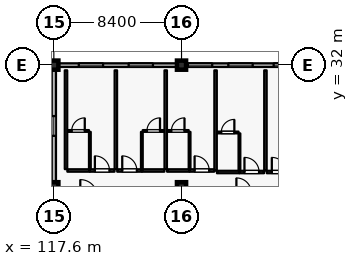
"""IFC4 building model, lengths in metres.
Left out: names, types, materials, properties, quantities, classifications, styles, units other than length and angle.
Written with IfcOpenShell. Run it as: python <this file> out.ifc"""

import sys

from ifc_helpers import new_model, si_unit, direction, frame, frame_2d, origin, origin_2d, place, context, subcontext, project, spatial, rectangle, extrude, element, fill, save


model = new_model("IFC4")
c1 = context("Model", 3, precision=1e-05, world=origin(), true_north=direction((0.0, 1.0)))
c2 = subcontext(c1, "Body", "Model", "MODEL_VIEW")
j1 = project(units=[si_unit("LENGTHUNIT", "METRE"), si_unit("PLANEANGLEUNIT", "RADIAN")], contexts=[c1])
p1 = place(None, origin())
s1 = spatial("IfcSite", under=j1, at=p1, CompositionType="ELEMENT")
p2 = place(p1, origin())
s2 = spatial("IfcBuilding", under=s1, at=p2, CompositionType="ELEMENT")
p3 = place(p2, frame((0.0, 0.0, 39.6)))
s3 = spatial("IfcBuildingStorey", under=s2, at=p3, CompositionType="ELEMENT", Elevation=39.6)
for number, where, z_axis, x_axis in (
    (1, (117.6, 32.0, 0.0), (0.0, 0.0, 1.0), (1.0, 0.0, 0.0)),
    (2, (126.0, 32.0, 0.0), (0.0, 0.0, 1.0), (1.0, 0.0, 0.0)),
    (3, (117.6, 24.0, 0.0), (0.0, 0.0, 1.0), (1.0, 0.0, 0.0)),
    (4, (126.0, 24.0, 0.0), (0.0, 0.0, 1.0), (1.0, 0.0, 0.0)),
):
    element("IfcColumn", number, at=place(p3, frame(where, z_axis=z_axis, x_axis=x_axis)), inside=s3, PredefinedType="COLUMN", context=c2, shape_type="SweptSolid", body=[
        extrude(rectangle(XDim=0.6, YDim=0.6, at=origin_2d()), origin(), (0.0, 0.0, 1.0), 3.6),
    ])
p4 = place(p3, frame((117.9, 32.0, 0.0), z_axis=(0.0, 0.0, 1.0), x_axis=(1.0, 0.0, 0.0)))
e5 = element("IfcWall", 5, at=p4, inside=s3, PredefinedType="SOLIDWALL", context=c2, shape_type="SweptSolid", body=[
    extrude(rectangle(XDim=7.8, YDim=0.24, at=frame_2d((3.9, 0.0))), origin(), (0.0, 0.0, 1.0), 2.89),
])
p5 = place(p4, frame((1.34, 0.0, 0.8)))
e6 = element("IfcOpeningElement", 6, at=p5, cuts=e5, PredefinedType="OPENING", context=c2, shape_type="SweptSolid", body=[
    extrude(rectangle(XDim=1.6, YDim=1.6, at=frame_2d((0.8, 0.8))), frame((0.0, 0.13, 0.0), z_axis=(0.0, -1.0, 0.0), x_axis=(1.0, 0.0, 0.0)), (0.0, 0.0, 1.0), 0.26),
])
p6 = place(p4, frame((4.62, 0.0, 0.8)))
e7 = element("IfcOpeningElement", 7, at=p6, cuts=e5, PredefinedType="OPENING", context=c2, shape_type="SweptSolid", body=[
    extrude(rectangle(XDim=1.6, YDim=1.6, at=frame_2d((0.8, 0.8))), frame((0.0, 0.13, 0.0), z_axis=(0.0, -1.0, 0.0), x_axis=(1.0, 0.0, 0.0)), (0.0, 0.0, 1.0), 0.26),
])
p7 = place(p3, frame((126.3, 32.0, 0.0), z_axis=(0.0, 0.0, 1.0), x_axis=(1.0, 0.0, 0.0)))
e8 = element("IfcWall", 8, at=p7, inside=s3, PredefinedType="SOLIDWALL", context=c2, shape_type="SweptSolid", body=[
    extrude(rectangle(XDim=7.8, YDim=0.24, at=frame_2d((3.9, 0.0))), origin(), (0.0, 0.0, 1.0), 2.89),
])
p8 = place(p7, frame((0.12, 0.0, 0.8)))
e9 = element("IfcOpeningElement", 9, at=p8, cuts=e8, PredefinedType="OPENING", context=c2, shape_type="SweptSolid", body=[
    extrude(rectangle(XDim=1.6, YDim=1.6, at=frame_2d((0.8, 0.8))), frame((0.0, 0.13, 0.0), z_axis=(0.0, -1.0, 0.0), x_axis=(1.0, 0.0, 0.0)), (0.0, 0.0, 1.0), 0.26),
])
p9 = place(p7, frame((2.78, 0.0, 0.8)))
e10 = element("IfcOpeningElement", 10, at=p9, cuts=e8, PredefinedType="OPENING", context=c2, shape_type="SweptSolid", body=[
    extrude(rectangle(XDim=1.6, YDim=1.6, at=frame_2d((0.8, 0.8))), frame((0.0, 0.13, 0.0), z_axis=(0.0, -1.0, 0.0), x_axis=(1.0, 0.0, 0.0)), (0.0, 0.0, 1.0), 0.26),
])
p10 = place(p7, frame((5.76, 0.0, 0.8)))
e11 = element("IfcOpeningElement", 11, at=p10, cuts=e8, PredefinedType="OPENING", context=c2, shape_type="SweptSolid", body=[
    extrude(rectangle(XDim=1.6, YDim=1.6, at=frame_2d((0.8, 0.8))), frame((0.0, 0.13, 0.0), z_axis=(0.0, -1.0, 0.0), x_axis=(1.0, 0.0, 0.0)), (0.0, 0.0, 1.0), 0.26),
])
p11 = place(p3, frame((117.6, 24.3, 0.0), z_axis=(0.0, 0.0, 1.0), x_axis=(0.0, 1.0, 0.0)))
e12 = element("IfcWall", 12, at=p11, inside=s3, PredefinedType="SOLIDWALL", context=c2, shape_type="SweptSolid", body=[
    extrude(rectangle(XDim=7.4, YDim=0.28, at=frame_2d((3.7, 0.0))), origin(), (0.0, 0.0, 1.0), 2.7),
])
p12 = place(p11, frame((3.05, 0.0, 0.5)))
e13 = element("IfcOpeningElement", 13, at=p12, cuts=e12, PredefinedType="OPENING", context=c2, shape_type="SweptSolid", body=[
    extrude(rectangle(XDim=1.3, YDim=1.65, at=frame_2d((0.65, 0.825))), frame((0.0, 0.15, 0.0), z_axis=(0.0, -1.0, 0.0), x_axis=(1.0, 0.0, 0.0)), (0.0, 0.0, 1.0), 0.3),
])
p13 = place(p3, frame((118.49, 25.07, 0.0), z_axis=(0.0, 0.0, 1.0), x_axis=(1.0, 0.0, 0.0)))
e14 = element("IfcWall", 14, at=p13, inside=s3, PredefinedType="PARTITIONING", context=c2, shape_type="SweptSolid", body=[
    extrude(rectangle(XDim=1.47, YDim=0.16, at=frame_2d((0.735, 0.0))), origin(), (0.0, 0.0, 1.0), 3.335),
])
p14 = place(p3, frame((119.97, 25.07, 0.0), z_axis=(0.0, 0.0, 1.0), x_axis=(1.0, 0.0, 0.0)))
e15 = element("IfcWall", 15, at=p14, inside=s3, PredefinedType="PARTITIONING", context=c2, shape_type="SweptSolid", body=[
    extrude(rectangle(XDim=1.62, YDim=0.16, at=frame_2d((0.81, 0.0))), origin(), (0.0, 0.0, 1.0), 3.335),
])
p15 = place(p14, frame((0.33, 0.0, 0.0)))
e16 = element("IfcOpeningElement", 16, at=p15, cuts=e15, PredefinedType="OPENING", context=c2, shape_type="SweptSolid", body=[
    extrude(rectangle(XDim=0.96, YDim=2.2, at=frame_2d((0.48, 1.1))), frame((0.0, 0.09, 0.0), z_axis=(0.0, -1.0, 0.0), x_axis=(1.0, 0.0, 0.0)), (0.0, 0.0, 1.0), 0.18),
])
p16 = place(p3, frame((119.97, 25.16, 0.0), z_axis=(0.0, 0.0, 1.0), x_axis=(0.0, 1.0, 0.0)))
e17 = element("IfcWall", 17, at=p16, inside=s3, PredefinedType="PARTITIONING", context=c2, shape_type="SweptSolid", body=[
    extrude(rectangle(XDim=2.45, YDim=0.115, at=frame_2d((1.225, 0.0))), origin(), (0.0, 0.0, 1.0), 3.335),
])
p17 = place(p3, frame((118.5, 27.67, 0.0), z_axis=(0.0, 0.0, 1.0), x_axis=(1.0, 0.0, 0.0)))
e18 = element("IfcWall", 18, at=p17, inside=s3, PredefinedType="PARTITIONING", context=c2, shape_type="SweptSolid", body=[
    extrude(rectangle(XDim=1.41, YDim=0.115, at=frame_2d((0.705, 0.0))), origin(), (0.0, 0.0, 1.0), 3.335),
])
p18 = place(p17, frame((0.275, 0.0, 0.0)))
e19 = element("IfcOpeningElement", 19, at=p18, cuts=e18, PredefinedType="OPENING", context=c2, shape_type="SweptSolid", body=[
    extrude(rectangle(XDim=0.86, YDim=2.12, at=frame_2d((0.43, 1.06))), frame((0.0, 0.067, 0.0), z_axis=(0.0, -1.0, 0.0), x_axis=(1.0, 0.0, 0.0)), (0.0, 0.0, 1.0), 0.135),
])
p19 = place(p3, frame((118.4, 25.16, 0.0), z_axis=(0.0, 0.0, 1.0), x_axis=(0.0, 1.0, 0.0)))
e20 = element("IfcWall", 20, at=p19, inside=s3, PredefinedType="PARTITIONING", context=c2, shape_type="SweptSolid", body=[
    extrude(rectangle(XDim=6.5, YDim=0.16, at=frame_2d((3.25, 0.0))), origin(), (0.0, 0.0, 1.0), 3.335),
])
p20 = place(p3, frame((121.77, 25.07, 0.0), z_axis=(0.0, 0.0, 1.0), x_axis=(1.0, 0.0, 0.0)))
e21 = element("IfcWall", 21, at=p20, inside=s3, PredefinedType="PARTITIONING", context=c2, shape_type="SweptSolid", body=[
    extrude(rectangle(XDim=1.62, YDim=0.16, at=frame_2d((0.81, 0.0))), origin(), (0.0, 0.0, 1.0), 3.335),
])
p21 = place(p20, frame((0.33, 0.0, 0.0)))
e22 = element("IfcOpeningElement", 22, at=p21, cuts=e21, PredefinedType="OPENING", context=c2, shape_type="SweptSolid", body=[
    extrude(rectangle(XDim=0.96, YDim=2.2, at=frame_2d((0.48, 1.1))), frame((0.0, 0.09, 0.0), z_axis=(0.0, -1.0, 0.0), x_axis=(1.0, 0.0, 0.0)), (0.0, 0.0, 1.0), 0.18),
])
p22 = place(p3, frame((123.4, 25.07, 0.0), z_axis=(0.0, 0.0, 1.0), x_axis=(1.0, 0.0, 0.0)))
e23 = element("IfcWall", 23, at=p22, inside=s3, PredefinedType="PARTITIONING", context=c2, shape_type="SweptSolid", body=[
    extrude(rectangle(XDim=1.47, YDim=0.16, at=frame_2d((0.735, 0.0))), origin(), (0.0, 0.0, 1.0), 3.335),
])
p23 = place(p3, frame((123.39, 25.16, 0.0), z_axis=(0.0, 0.0, 1.0), x_axis=(0.0, 1.0, 0.0)))
e24 = element("IfcWall", 24, at=p23, inside=s3, PredefinedType="PARTITIONING", context=c2, shape_type="SweptSolid", body=[
    extrude(rectangle(XDim=2.45, YDim=0.115, at=frame_2d((1.225, 0.0))), origin(), (0.0, 0.0, 1.0), 3.335),
])
p24 = place(p3, frame((123.45, 27.67, 0.0), z_axis=(0.0, 0.0, 1.0), x_axis=(1.0, 0.0, 0.0)))
e25 = element("IfcWall", 25, at=p24, inside=s3, PredefinedType="PARTITIONING", context=c2, shape_type="SweptSolid", body=[
    extrude(rectangle(XDim=1.41, YDim=0.115, at=frame_2d((0.705, 0.0))), origin(), (0.0, 0.0, 1.0), 3.335),
])
p25 = place(p24, frame((0.275, 0.0, 0.0)))
e26 = element("IfcOpeningElement", 26, at=p25, cuts=e25, PredefinedType="OPENING", context=c2, shape_type="SweptSolid", body=[
    extrude(rectangle(XDim=0.86, YDim=2.12, at=frame_2d((0.43, 1.06))), frame((0.0, 0.067, 0.0), z_axis=(0.0, -1.0, 0.0), x_axis=(1.0, 0.0, 0.0)), (0.0, 0.0, 1.0), 0.135),
])
p26 = place(p3, frame((121.68, 25.16, 0.0), z_axis=(0.0, 0.0, 1.0), x_axis=(0.0, 1.0, 0.0)))
e27 = element("IfcWall", 27, at=p26, inside=s3, PredefinedType="PARTITIONING", context=c2, shape_type="SweptSolid", body=[
    extrude(rectangle(XDim=6.5, YDim=0.16, at=frame_2d((3.25, 0.0))), origin(), (0.0, 0.0, 1.0), 3.335),
])
p27 = place(p3, frame((125.05, 25.07, 0.0), z_axis=(0.0, 0.0, 1.0), x_axis=(1.0, 0.0, 0.0)))
e28 = element("IfcWall", 28, at=p27, inside=s3, PredefinedType="PARTITIONING", context=c2, shape_type="SweptSolid", body=[
    extrude(rectangle(XDim=1.47, YDim=0.16, at=frame_2d((0.735, 0.0))), origin(), (0.0, 0.0, 1.0), 3.335),
])
p28 = place(p3, frame((126.53, 25.07, 0.0), z_axis=(0.0, 0.0, 1.0), x_axis=(1.0, 0.0, 0.0)))
e29 = element("IfcWall", 29, at=p28, inside=s3, PredefinedType="PARTITIONING", context=c2, shape_type="SweptSolid", body=[
    extrude(rectangle(XDim=1.62, YDim=0.16, at=frame_2d((0.81, 0.0))), origin(), (0.0, 0.0, 1.0), 3.335),
])
p29 = place(p28, frame((0.33, 0.0, 0.0)))
e30 = element("IfcOpeningElement", 30, at=p29, cuts=e29, PredefinedType="OPENING", context=c2, shape_type="SweptSolid", body=[
    extrude(rectangle(XDim=0.96, YDim=2.2, at=frame_2d((0.48, 1.1))), frame((0.0, 0.09, 0.0), z_axis=(0.0, -1.0, 0.0), x_axis=(1.0, 0.0, 0.0)), (0.0, 0.0, 1.0), 0.18),
])
p30 = place(p3, frame((126.53, 25.16, 0.0), z_axis=(0.0, 0.0, 1.0), x_axis=(0.0, 1.0, 0.0)))
e31 = element("IfcWall", 31, at=p30, inside=s3, PredefinedType="PARTITIONING", context=c2, shape_type="SweptSolid", body=[
    extrude(rectangle(XDim=2.45, YDim=0.115, at=frame_2d((1.225, 0.0))), origin(), (0.0, 0.0, 1.0), 3.335),
])
p31 = place(p3, frame((125.06, 27.67, 0.0), z_axis=(0.0, 0.0, 1.0), x_axis=(1.0, 0.0, 0.0)))
e32 = element("IfcWall", 32, at=p31, inside=s3, PredefinedType="PARTITIONING", context=c2, shape_type="SweptSolid", body=[
    extrude(rectangle(XDim=1.41, YDim=0.115, at=frame_2d((0.705, 0.0))), origin(), (0.0, 0.0, 1.0), 3.335),
])
p32 = place(p31, frame((0.275, 0.0, 0.0)))
e33 = element("IfcOpeningElement", 33, at=p32, cuts=e32, PredefinedType="OPENING", context=c2, shape_type="SweptSolid", body=[
    extrude(rectangle(XDim=0.86, YDim=2.12, at=frame_2d((0.43, 1.06))), frame((0.0, 0.067, 0.0), z_axis=(0.0, -1.0, 0.0), x_axis=(1.0, 0.0, 0.0)), (0.0, 0.0, 1.0), 0.135),
])
p33 = place(p3, frame((124.96, 25.16, 0.0), z_axis=(0.0, 0.0, 1.0), x_axis=(0.0, 1.0, 0.0)))
e34 = element("IfcWall", 34, at=p33, inside=s3, PredefinedType="PARTITIONING", context=c2, shape_type="SweptSolid", body=[
    extrude(rectangle(XDim=6.5, YDim=0.16, at=frame_2d((3.25, 0.0))), origin(), (0.0, 0.0, 1.0), 3.335),
])
p34 = place(p3, frame((128.33, 24.97, 0.0), z_axis=(0.0, 0.0, 1.0), x_axis=(1.0, 0.0, 0.0)))
e35 = element("IfcWall", 35, at=p34, inside=s3, PredefinedType="PARTITIONING", context=c2, shape_type="SweptSolid", body=[
    extrude(rectangle(XDim=1.47, YDim=0.16, at=frame_2d((0.735, 0.0))), origin(), (0.0, 0.0, 1.0), 3.335),
])
p35 = place(p3, frame((129.81, 24.97, 0.0), z_axis=(0.0, 0.0, 1.0), x_axis=(1.0, 0.0, 0.0)))
e36 = element("IfcWall", 36, at=p35, inside=s3, PredefinedType="PARTITIONING", context=c2, shape_type="SweptSolid", body=[
    extrude(rectangle(XDim=1.62, YDim=0.16, at=frame_2d((0.81, 0.0))), origin(), (0.0, 0.0, 1.0), 3.335),
])
p36 = place(p35, frame((0.33, 0.0, 0.0)))
e37 = element("IfcOpeningElement", 37, at=p36, cuts=e36, PredefinedType="OPENING", context=c2, shape_type="SweptSolid", body=[
    extrude(rectangle(XDim=0.96, YDim=2.2, at=frame_2d((0.48, 1.1))), frame((0.0, 0.09, 0.0), z_axis=(0.0, -1.0, 0.0), x_axis=(1.0, 0.0, 0.0)), (0.0, 0.0, 1.0), 0.18),
])
p37 = place(p3, frame((129.81, 25.06, 0.0), z_axis=(0.0, 0.0, 1.0), x_axis=(0.0, 1.0, 0.0)))
e38 = element("IfcWall", 38, at=p37, inside=s3, PredefinedType="PARTITIONING", context=c2, shape_type="SweptSolid", body=[
    extrude(rectangle(XDim=2.45, YDim=0.115, at=frame_2d((1.225, 0.0))), origin(), (0.0, 0.0, 1.0), 3.335),
])
p38 = place(p3, frame((128.34, 27.57, 0.0), z_axis=(0.0, 0.0, 1.0), x_axis=(1.0, 0.0, 0.0)))
e39 = element("IfcWall", 39, at=p38, inside=s3, PredefinedType="PARTITIONING", context=c2, shape_type="SweptSolid", body=[
    extrude(rectangle(XDim=1.41, YDim=0.115, at=frame_2d((0.705, 0.0))), origin(), (0.0, 0.0, 1.0), 3.335),
])
p39 = place(p38, frame((0.275, 0.0, 0.0)))
e40 = element("IfcOpeningElement", 40, at=p39, cuts=e39, PredefinedType="OPENING", context=c2, shape_type="SweptSolid", body=[
    extrude(rectangle(XDim=0.86, YDim=2.12, at=frame_2d((0.43, 1.06))), frame((0.0, 0.067, 0.0), z_axis=(0.0, -1.0, 0.0), x_axis=(1.0, 0.0, 0.0)), (0.0, 0.0, 1.0), 0.135),
])
p40 = place(p3, frame((128.24, 25.06, 0.0), z_axis=(0.0, 0.0, 1.0), x_axis=(0.0, 1.0, 0.0)))
e41 = element("IfcWall", 41, at=p40, inside=s3, PredefinedType="PARTITIONING", context=c2, shape_type="SweptSolid", body=[
    extrude(rectangle(XDim=6.6, YDim=0.16, at=frame_2d((3.3, 0.0))), origin(), (0.0, 0.0, 1.0), 3.335),
])
p41 = place(p3, frame((131.61, 24.97, 0.0), z_axis=(0.0, 0.0, 1.0), x_axis=(1.0, 0.0, 0.0)))
e42 = element("IfcWall", 42, at=p41, inside=s3, PredefinedType="PARTITIONING", context=c2, shape_type="SweptSolid", body=[
    extrude(rectangle(XDim=1.62, YDim=0.16, at=frame_2d((0.81, 0.0))), origin(), (0.0, 0.0, 1.0), 3.335),
])
p42 = place(p41, frame((0.33, 0.0, 0.0)))
e43 = element("IfcOpeningElement", 43, at=p42, cuts=e42, PredefinedType="OPENING", context=c2, shape_type="SweptSolid", body=[
    extrude(rectangle(XDim=0.96, YDim=2.2, at=frame_2d((0.48, 1.1))), frame((0.0, 0.09, 0.0), z_axis=(0.0, -1.0, 0.0), x_axis=(1.0, 0.0, 0.0)), (0.0, 0.0, 1.0), 0.18),
])
p43 = place(p3, frame((131.52, 25.06, 0.0), z_axis=(0.0, 0.0, 1.0), x_axis=(0.0, 1.0, 0.0)))
e44 = element("IfcWall", 44, at=p43, inside=s3, PredefinedType="PARTITIONING", context=c2, shape_type="SweptSolid", body=[
    extrude(rectangle(XDim=6.6, YDim=0.16, at=frame_2d((3.3, 0.0))), origin(), (0.0, 0.0, 1.0), 3.335),
])
p44 = place(p5, origin())
e45 = element("IfcWindow", 45, at=p44, inside=s3, PartitioningType="SINGLE_PANEL", PredefinedType="WINDOW", context=c2, shape_type="SweptSolid", body=[
    extrude(rectangle(XDim=1.6, YDim=1.6, at=frame_2d((0.8, 0.8))), frame((0.0, 0.03, 0.0), z_axis=(0.0, -1.0, 0.0), x_axis=(1.0, 0.0, 0.0)), (0.0, 0.0, 1.0), 0.06),
])
fill(e6, e45)
p45 = place(p6, origin())
e46 = element("IfcWindow", 46, at=p45, inside=s3, PartitioningType="SINGLE_PANEL", PredefinedType="WINDOW", context=c2, shape_type="SweptSolid", body=[
    extrude(rectangle(XDim=1.6, YDim=1.6, at=frame_2d((0.8, 0.8))), frame((0.0, 0.03, 0.0), z_axis=(0.0, -1.0, 0.0), x_axis=(1.0, 0.0, 0.0)), (0.0, 0.0, 1.0), 0.06),
])
fill(e7, e46)
p46 = place(p8, origin())
e47 = element("IfcWindow", 47, at=p46, inside=s3, PartitioningType="SINGLE_PANEL", PredefinedType="WINDOW", context=c2, shape_type="SweptSolid", body=[
    extrude(rectangle(XDim=1.6, YDim=1.6, at=frame_2d((0.8, 0.8))), frame((0.0, 0.03, 0.0), z_axis=(0.0, -1.0, 0.0), x_axis=(1.0, 0.0, 0.0)), (0.0, 0.0, 1.0), 0.06),
])
fill(e9, e47)
p47 = place(p9, origin())
e48 = element("IfcWindow", 48, at=p47, inside=s3, PartitioningType="SINGLE_PANEL", PredefinedType="WINDOW", context=c2, shape_type="SweptSolid", body=[
    extrude(rectangle(XDim=1.6, YDim=1.6, at=frame_2d((0.8, 0.8))), frame((0.0, 0.03, 0.0), z_axis=(0.0, -1.0, 0.0), x_axis=(1.0, 0.0, 0.0)), (0.0, 0.0, 1.0), 0.06),
])
fill(e10, e48)
p48 = place(p10, origin())
e49 = element("IfcWindow", 49, at=p48, inside=s3, PartitioningType="SINGLE_PANEL", PredefinedType="WINDOW", context=c2, shape_type="SweptSolid", body=[
    extrude(rectangle(XDim=1.6, YDim=1.6, at=frame_2d((0.8, 0.8))), frame((0.0, 0.03, 0.0), z_axis=(0.0, -1.0, 0.0), x_axis=(1.0, 0.0, 0.0)), (0.0, 0.0, 1.0), 0.06),
])
fill(e11, e49)
p49 = place(p12, origin())
e50 = element("IfcWindow", 50, at=p49, inside=s3, PartitioningType="SINGLE_PANEL", PredefinedType="WINDOW", context=c2, shape_type="SweptSolid", body=[
    extrude(rectangle(XDim=1.3, YDim=1.65, at=frame_2d((0.65, 0.825))), frame((0.0, 0.03, 0.0), z_axis=(0.0, -1.0, 0.0), x_axis=(1.0, 0.0, 0.0)), (0.0, 0.0, 1.0), 0.06),
])
fill(e13, e50)
p50 = place(p15, origin())
e51 = element("IfcDoor", 51, at=p50, inside=s3, OperationType="SINGLE_SWING_LEFT", PredefinedType="DOOR", context=c2, shape_type="SweptSolid", body=[
    extrude(rectangle(XDim=0.96, YDim=2.2, at=frame_2d((0.48, 1.1))), frame((0.0, 0.025, 0.0), z_axis=(0.0, -1.0, 0.0), x_axis=(1.0, 0.0, 0.0)), (0.0, 0.0, 1.0), 0.05),
])
fill(e16, e51)
p51 = place(p18, origin())
e52 = element("IfcDoor", 52, at=p51, inside=s3, OperationType="SINGLE_SWING_RIGHT", PredefinedType="DOOR", context=c2, shape_type="SweptSolid", body=[
    extrude(rectangle(XDim=0.86, YDim=2.12, at=frame_2d((0.43, 1.06))), frame((0.0, 0.025, 0.0), z_axis=(0.0, -1.0, 0.0), x_axis=(1.0, 0.0, 0.0)), (0.0, 0.0, 1.0), 0.05),
])
fill(e19, e52)
p52 = place(p21, origin())
e53 = element("IfcDoor", 53, at=p52, inside=s3, OperationType="SINGLE_SWING_LEFT", PredefinedType="DOOR", context=c2, shape_type="SweptSolid", body=[
    extrude(rectangle(XDim=0.96, YDim=2.2, at=frame_2d((0.48, 1.1))), frame((0.0, 0.025, 0.0), z_axis=(0.0, -1.0, 0.0), x_axis=(1.0, 0.0, 0.0)), (0.0, 0.0, 1.0), 0.05),
])
fill(e22, e53)
p53 = place(p25, origin())
e54 = element("IfcDoor", 54, at=p53, inside=s3, OperationType="SINGLE_SWING_RIGHT", PredefinedType="DOOR", context=c2, shape_type="SweptSolid", body=[
    extrude(rectangle(XDim=0.86, YDim=2.12, at=frame_2d((0.43, 1.06))), frame((0.0, 0.025, 0.0), z_axis=(0.0, -1.0, 0.0), x_axis=(1.0, 0.0, 0.0)), (0.0, 0.0, 1.0), 0.05),
])
fill(e26, e54)
p54 = place(p29, origin())
e55 = element("IfcDoor", 55, at=p54, inside=s3, OperationType="SINGLE_SWING_LEFT", PredefinedType="DOOR", context=c2, shape_type="SweptSolid", body=[
    extrude(rectangle(XDim=0.96, YDim=2.2, at=frame_2d((0.48, 1.1))), frame((0.0, 0.025, 0.0), z_axis=(0.0, -1.0, 0.0), x_axis=(1.0, 0.0, 0.0)), (0.0, 0.0, 1.0), 0.05),
])
fill(e30, e55)
p55 = place(p32, origin())
e56 = element("IfcDoor", 56, at=p55, inside=s3, OperationType="SINGLE_SWING_RIGHT", PredefinedType="DOOR", context=c2, shape_type="SweptSolid", body=[
    extrude(rectangle(XDim=0.86, YDim=2.12, at=frame_2d((0.43, 1.06))), frame((0.0, 0.025, 0.0), z_axis=(0.0, -1.0, 0.0), x_axis=(1.0, 0.0, 0.0)), (0.0, 0.0, 1.0), 0.05),
])
fill(e33, e56)
p56 = place(p36, origin())
e57 = element("IfcDoor", 57, at=p56, inside=s3, OperationType="SINGLE_SWING_LEFT", PredefinedType="DOOR", context=c2, shape_type="SweptSolid", body=[
    extrude(rectangle(XDim=0.96, YDim=2.2, at=frame_2d((0.48, 1.1))), frame((0.0, 0.025, 0.0), z_axis=(0.0, -1.0, 0.0), x_axis=(1.0, 0.0, 0.0)), (0.0, 0.0, 1.0), 0.05),
])
fill(e37, e57)
p57 = place(p39, origin())
e58 = element("IfcDoor", 58, at=p57, inside=s3, OperationType="SINGLE_SWING_RIGHT", PredefinedType="DOOR", context=c2, shape_type="SweptSolid", body=[
    extrude(rectangle(XDim=0.86, YDim=2.12, at=frame_2d((0.43, 1.06))), frame((0.0, 0.025, 0.0), z_axis=(0.0, -1.0, 0.0), x_axis=(1.0, 0.0, 0.0)), (0.0, 0.0, 1.0), 0.05),
])
fill(e40, e58)
p58 = place(p42, origin())
e59 = element("IfcDoor", 59, at=p58, inside=s3, OperationType="SINGLE_SWING_LEFT", PredefinedType="DOOR", context=c2, shape_type="SweptSolid", body=[
    extrude(rectangle(XDim=0.96, YDim=2.2, at=frame_2d((0.48, 1.1))), frame((0.0, 0.025, 0.0), z_axis=(0.0, -1.0, 0.0), x_axis=(1.0, 0.0, 0.0)), (0.0, 0.0, 1.0), 0.05),
])
fill(e43, e59)
save(model, sys.argv[1])
